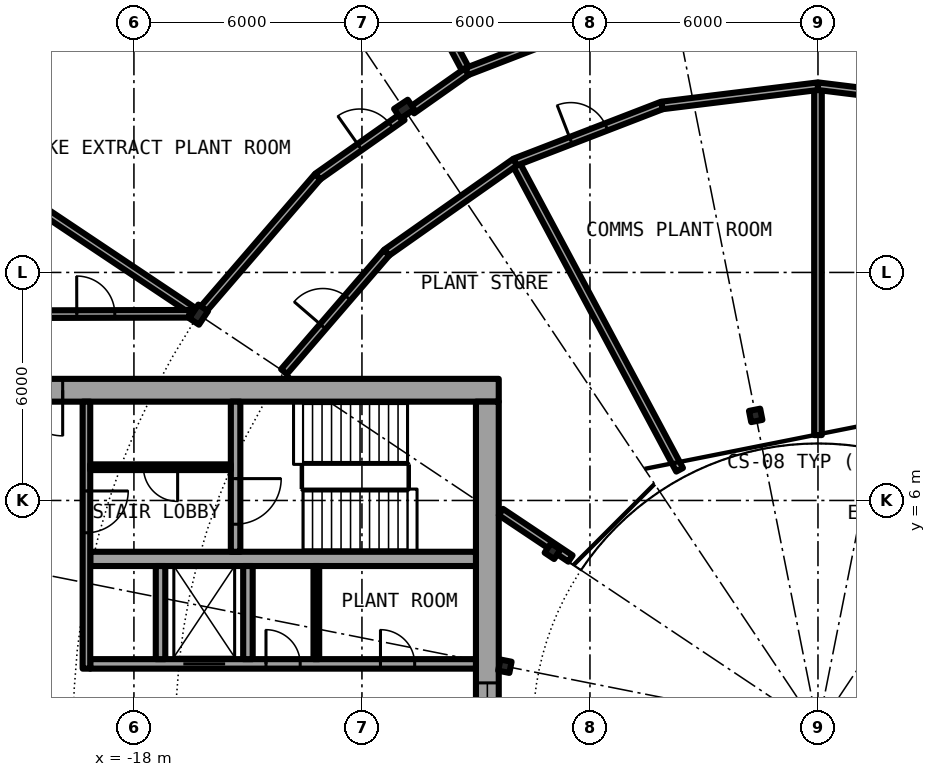
"""IFC4 building model, lengths in metres.
Left out: names, types, materials, properties, quantities, classifications, styles, units other than length and angle.
Written with IfcOpenShell. Run it as: python <this file> out.ifc"""

import sys

from ifc_helpers import new_model, si_unit, direction, frame, frame_2d, origin, origin_2d, place, context, subcontext, project, spatial, rectangle, i_section, extrude, element, fill, save


model = new_model("IFC4")
c1 = context("Model", 3, precision=1e-05, world=origin(), true_north=direction((0.0, 1.0)))
c2 = subcontext(c1, "Body", "Model", "MODEL_VIEW")
j1 = project(units=[si_unit("LENGTHUNIT", "METRE"), si_unit("PLANEANGLEUNIT", "RADIAN")], contexts=[c1])
p1 = place(None, origin())
s1 = spatial("IfcSite", under=j1, at=p1, CompositionType="ELEMENT")
p2 = place(p1, origin())
s2 = spatial("IfcBuilding", under=s1, at=p2, CompositionType="ELEMENT")
p3 = place(p2, frame((0.0, 0.0, 103.25)))
s3 = spatial("IfcBuildingStorey", under=s2, at=p3, CompositionType="ELEMENT", Elevation=103.25)
for number, where, z_axis, x_axis in (
    (1, (-10.889, 16.297, 0.0), (0.0, 0.0, 1.0), (-0.556, 0.831, 0.0)),
    (2, (-16.297, 10.889, 0.0), (0.0, 0.0, 1.0), (-0.831, 0.556, 0.0)),
):
    element("IfcColumn", number, at=place(p3, frame(where, z_axis=z_axis, x_axis=x_axis)), inside=s3, PredefinedType="COLUMN", context=c2, shape_type="SweptSolid", body=[
        extrude(i_section(OverallWidth=0.307, OverallDepth=0.432, WebThickness=0.021, FlangeThickness=0.04, FilletRadius=0.027, at=origin_2d()), origin(), (0.0, 0.0, 1.0), 4.2),
    ])
for number, where, z_axis, x_axis in (
    (3, (-1.639, 8.239, 0.0), (0.0, 0.0, 1.0), (-0.195, 0.981, 0.0)),
    (4, (-6.984, 4.667, 0.0), (0.0, 0.0, 1.0), (-0.831, 0.556, 0.0)),
    (5, (-8.239, 1.639, 0.0), (0.0, 0.0, 1.0), (-0.981, 0.195, 0.0)),
):
    element("IfcColumn", number, at=place(p3, frame(where, z_axis=z_axis, x_axis=x_axis)), inside=s3, PredefinedType="COLUMN", context=c2, shape_type="SweptSolid", body=[
        extrude(i_section(OverallWidth=0.3, OverallDepth=0.3, WebThickness=0.011, FlangeThickness=0.019, FilletRadius=0.027, at=origin_2d()), origin(), (0.0, 0.0, 1.0), 4.2),
    ])
p4 = place(p3, frame((-8.4, 8.9, 0.0), z_axis=(0.0, 0.0, 1.0), x_axis=(-1.0, 0.0, 0.0)))
e6 = element("IfcWall", 6, at=p4, inside=s3, PredefinedType="SHEAR", context=c2, shape_type="SweptSolid", body=[
    extrude(rectangle(XDim=13.8, YDim=0.6, at=frame_2d((6.9, 0.0))), origin(), (0.0, 0.0, 1.0), 4.2),
])
p5 = place(p4, frame((11.475, 0.0, 0.0)))
e7 = element("IfcOpeningElement", 7, at=p5, cuts=e6, PredefinedType="OPENING", context=c2, shape_type="SweptSolid", body=[
    extrude(rectangle(XDim=1.2, YDim=2.3, at=frame_2d((0.6, 1.15))), frame((0.0, 0.31, 0.0), z_axis=(0.0, -1.0, 0.0), x_axis=(1.0, 0.0, 0.0)), (0.0, 0.0, 1.0), 0.62),
])
p6 = place(p3, frame((-8.7, 8.6, 0.0), z_axis=(0.0, 0.0, 1.0), x_axis=(0.0, -1.0, 0.0)))
e8 = element("IfcWall", 8, at=p6, inside=s3, PredefinedType="SHEAR", context=c2, shape_type="SweptSolid", body=[
    extrude(rectangle(XDim=17.2, YDim=0.6, at=frame_2d((8.6, 0.0))), origin(), (0.0, 0.0, 1.0), 4.2),
])
p7 = place(p6, frame((7.4, 0.0, 0.1)))
e9 = element("IfcOpeningElement", 9, at=p7, cuts=e8, PredefinedType="OPENING", context=c2, shape_type="SweptSolid", body=[
    extrude(rectangle(XDim=2.4, YDim=2.2, at=frame_2d((1.2, 1.1))), frame((0.0, 0.31, 0.0), z_axis=(0.0, -1.0, 0.0), x_axis=(1.0, 0.0, 0.0)), (0.0, 0.0, 1.0), 0.62),
])
p8 = place(p3, frame((-19.15, 1.7, 0.0), z_axis=(0.0, 0.0, 1.0), x_axis=(1.0, 0.0, 0.0)))
e10 = element("IfcWall", 10, at=p8, inside=s3, PredefinedType="SHEAR", context=c2, shape_type="SweptSolid", body=[
    extrude(rectangle(XDim=10.15, YDim=0.25, at=frame_2d((5.075, 0.0))), origin(), (0.0, 0.0, 1.0), 4.2),
])
p9 = place(p8, frame((2.45, 0.0, 0.0)))
e11 = element("IfcOpeningElement", 11, at=p9, cuts=e10, PredefinedType="OPENING", context=c2, shape_type="SweptSolid", body=[
    extrude(rectangle(XDim=1.1, YDim=2.3, at=frame_2d((0.55, 1.15))), frame((0.0, 0.135, 0.0), z_axis=(0.0, -1.0, 0.0), x_axis=(1.0, 0.0, 0.0)), (0.0, 0.0, 1.0), 0.27),
])
p10 = place(p8, frame((7.637, 0.0, 0.0)))
e12 = element("IfcOpeningElement", 12, at=p10, cuts=e10, PredefinedType="OPENING", context=c2, shape_type="SweptSolid", body=[
    extrude(rectangle(XDim=0.9, YDim=2.3, at=frame_2d((0.45, 1.15))), frame((0.0, 0.135, 0.0), z_axis=(0.0, -1.0, 0.0), x_axis=(1.0, 0.0, 0.0)), (0.0, 0.0, 1.0), 0.27),
])
p11 = place(p8, frame((4.625, 0.0, 0.0)))
e13 = element("IfcOpeningElement", 13, at=p11, cuts=e10, PredefinedType="OPENING", context=c2, shape_type="SweptSolid", body=[
    extrude(rectangle(XDim=0.9, YDim=2.3, at=frame_2d((0.45, 1.15))), frame((0.0, 0.135, 0.0), z_axis=(0.0, -1.0, 0.0), x_axis=(1.0, 0.0, 0.0)), (0.0, 0.0, 1.0), 0.27),
])
p12 = place(p3, frame((-9.0, 4.462, 0.0), z_axis=(0.0, 0.0, 1.0), x_axis=(-1.0, 0.0, 0.0)))
e14 = element("IfcWall", 14, at=p12, inside=s3, PredefinedType="SHEAR", context=c2, shape_type="SweptSolid", body=[
    extrude(rectangle(XDim=10.15, YDim=0.375, at=frame_2d((5.075, 0.0))), origin(), (0.0, 0.0, 1.0), 4.2),
])
p13 = place(p3, frame((-15.325, 8.6, 0.0), z_axis=(0.0, 0.0, 1.0), x_axis=(0.0, -1.0, 0.0)))
e15 = element("IfcWall", 15, at=p13, inside=s3, PredefinedType="SHEAR", context=c2, shape_type="SweptSolid", body=[
    extrude(rectangle(XDim=3.95, YDim=0.25, at=frame_2d((1.975, 0.0))), origin(), (0.0, 0.0, 1.0), 4.2),
])
p14 = place(p13, frame((2.025, 0.0, 0.0)))
e16 = element("IfcOpeningElement", 16, at=p14, cuts=e15, PredefinedType="OPENING", context=c2, shape_type="SweptSolid", body=[
    extrude(rectangle(XDim=1.2, YDim=2.3, at=frame_2d((0.6, 1.15))), frame((0.0, 0.135, 0.0), z_axis=(0.0, -1.0, 0.0), x_axis=(1.0, 0.0, 0.0)), (0.0, 0.0, 1.0), 0.27),
])
for number, where, z_axis, x_axis in (
    (17, (-15.0, 1.825, 0.0), (0.0, 0.0, 1.0), (0.0, 1.0, 0.0)),
    (18, (-17.3, 1.825, 0.0), (0.0, 0.0, 1.0), (0.0, 1.0, 0.0)),
):
    element("IfcWall", number, at=place(p3, frame(where, z_axis=z_axis, x_axis=x_axis)), inside=s3, PredefinedType="SOLIDWALL", context=c2, shape_type="SweptSolid", body=[
        extrude(rectangle(XDim=2.45, YDim=0.25, at=frame_2d((1.225, 0.0))), origin(), (0.0, 0.0, 1.0), 3.85),
    ])
p15 = place(p3, frame((-19.25, 8.6, 0.0), z_axis=(0.0, 0.0, 1.0), x_axis=(0.0, -1.0, 0.0)))
e19 = element("IfcWall", 19, at=p15, inside=s3, PredefinedType="SOLIDWALL", context=c2, shape_type="SweptSolid", body=[
    extrude(rectangle(XDim=7.025, YDim=0.2, at=frame_2d((3.513, 0.0))), origin(), (0.0, 0.0, 1.0), 3.85),
])
p16 = place(p15, frame((2.35, 0.0, 0.0)))
e20 = element("IfcOpeningElement", 20, at=p16, cuts=e19, PredefinedType="OPENING", context=c2, shape_type="SweptSolid", body=[
    extrude(rectangle(XDim=1.1, YDim=2.3, at=frame_2d((0.55, 1.15))), frame((0.0, 0.11, 0.0), z_axis=(0.0, -1.0, 0.0), x_axis=(1.0, 0.0, 0.0)), (0.0, 0.0, 1.0), 0.22),
])
p17 = place(p3, frame((-13.2, 1.825, 0.0), z_axis=(0.0, 0.0, 1.0), x_axis=(0.0, 1.0, 0.0)))
e21 = element("IfcWall", 21, at=p17, inside=s3, PredefinedType="PARTITIONING", context=c2, shape_type="SweptSolid", body=[
    extrude(rectangle(XDim=2.45, YDim=0.15, at=frame_2d((1.225, 0.0))), origin(), (0.0, 0.0, 1.0), 3.85),
])
p18 = place(p3, frame((-15.45, 6.875, 0.0), z_axis=(0.0, 0.0, 1.0), x_axis=(-1.0, 0.0, 0.0)))
e22 = element("IfcWall", 22, at=p18, inside=s3, PredefinedType="PARTITIONING", context=c2, shape_type="SweptSolid", body=[
    extrude(rectangle(XDim=3.7, YDim=0.15, at=frame_2d((1.85, 0.0))), origin(), (0.0, 0.0, 1.0), 3.85),
])
p19 = place(p18, frame((1.4, 0.0, 0.0)))
e23 = element("IfcOpeningElement", 23, at=p19, cuts=e22, PredefinedType="OPENING", context=c2, shape_type="SweptSolid", body=[
    extrude(rectangle(XDim=0.9, YDim=2.3, at=frame_2d((0.45, 1.15))), frame((0.0, 0.085, 0.0), z_axis=(0.0, -1.0, 0.0), x_axis=(1.0, 0.0, 0.0)), (0.0, 0.0, 1.0), 0.17),
])
p20 = place(p3, frame((-22.595, 15.098, 0.0), z_axis=(0.0, 0.0, 1.0), x_axis=(0.831406593008, -0.555664536482, 0.0)))
e24 = element("IfcWall", 24, at=p20, inside=s3, PredefinedType="PARTITIONING", context=c2, shape_type="SweptSolid", body=[
    extrude(rectangle(XDim=7.358, YDim=0.2, at=frame_2d((3.679, 0.0))), origin(), (0.0, 0.0, 1.0), 3.85),
])
p21 = place(p3, frame((-12.813, 23.965, 0.0), z_axis=(0.0, 0.0, 1.0), x_axis=(0.471439510802, -0.881898399848, 0.0)))
e25 = element("IfcWall", 25, at=p21, inside=s3, PredefinedType="PARTITIONING", context=c2, shape_type="SweptSolid", body=[
    extrude(rectangle(XDim=7.575, YDim=0.2, at=frame_2d((3.787, 0.0))), origin(), (0.0, 0.0, 1.0), 3.85),
])
p22 = place(p3, frame((-7.969, 14.903, 0.0), z_axis=(0.0, 0.0, 1.0), x_axis=(0.471428625665, -0.881904218667, 0.0)))
e26 = element("IfcWall", 26, at=p22, inside=s3, PredefinedType="PARTITIONING", context=c2, shape_type="SweptSolid", body=[
    extrude(rectangle(XDim=9.18, YDim=0.2, at=frame_2d((4.59, 0.0))), origin(), (0.0, 0.0, 1.0), 3.85),
])
p23 = place(p3, frame((0.0, 7.72, 0.0), z_axis=(0.0, 0.0, 1.0), x_axis=(0.0, 1.0, 0.0)))
e27 = element("IfcWall", 27, at=p23, inside=s3, PredefinedType="PARTITIONING", context=c2, shape_type="SweptSolid", body=[
    extrude(rectangle(XDim=9.18, YDim=0.2, at=frame_2d((4.59, 0.0))), origin(), (0.0, 0.0, 1.0), 3.85),
])
p24 = place(p3, frame((-6.513, 4.472, 0.0), z_axis=(0.0, 0.0, 1.0), x_axis=(-0.831333375071, 0.555774072347, 0.0)))
e28 = element("IfcWall", 28, at=p24, inside=s3, PredefinedType="PARTITIONING", context=c2, shape_type="SweptSolid", body=[
    extrude(rectangle(XDim=2.203, YDim=0.2, at=frame_2d((1.101, 0.0))), origin(), (0.0, 0.0, 1.0), 3.85),
])
p25 = place(p3, frame((-21.675, 10.9, 0.0), z_axis=(0.0, 0.0, 1.0), x_axis=(0.999997173357, 0.002377662213, 0.0)))
e29 = element("IfcWall", 29, at=p25, inside=s3, PredefinedType="PARTITIONING", context=c2, shape_type="SweptSolid", body=[
    extrude(rectangle(XDim=5.134, YDim=0.2, at=frame_2d((2.567, 0.0))), origin(), (0.0, 0.0, 1.0), 3.85),
])
p26 = place(p25, frame((2.171, 0.0, 0.0)))
e30 = element("IfcOpeningElement", 30, at=p26, cuts=e29, PredefinedType="OPENING", context=c2, shape_type="SweptSolid", body=[
    extrude(rectangle(XDim=1.0, YDim=2.3, at=frame_2d((0.5, 1.15))), frame((0.0, 0.11, 0.0), z_axis=(0.0, -1.0, 0.0), x_axis=(1.0, 0.0, 0.0)), (0.0, 0.0, 1.0), 0.22),
])
p27 = place(p3, frame((-14.052, 9.389, 0.0), z_axis=(0.0, 0.0, 1.0), x_axis=(0.653212695939, 0.757174467256, 0.0)))
e31 = element("IfcWall", 31, at=p27, inside=s3, PredefinedType="PARTITIONING", context=c2, shape_type="SweptSolid", body=[
    extrude(rectangle(XDim=4.138, YDim=0.2, at=frame_2d((2.069, 0.0))), origin(), (0.0, 0.0, 1.0), 3.85),
])
p28 = place(p27, frame((1.569, 0.0, 0.0)))
e32 = element("IfcOpeningElement", 32, at=p28, cuts=e31, PredefinedType="OPENING", context=c2, shape_type="SweptSolid", body=[
    extrude(rectangle(XDim=1.0, YDim=2.3, at=frame_2d((0.5, 1.15))), frame((0.0, 0.11, 0.0), z_axis=(0.0, -1.0, 0.0), x_axis=(1.0, 0.0, 0.0)), (0.0, 0.0, 1.0), 0.22),
])
p29 = place(p3, frame((-11.349, 12.522, 0.0), z_axis=(0.0, 0.0, 1.0), x_axis=(0.817567680547, 0.575832517079, 0.0)))
e33 = element("IfcWall", 33, at=p29, inside=s3, PredefinedType="PARTITIONING", context=c2, shape_type="SweptSolid", body=[
    extrude(rectangle(XDim=4.137, YDim=0.2, at=frame_2d((2.068, 0.0))), origin(), (0.0, 0.0, 1.0), 3.85),
])
p30 = place(p3, frame((-7.967, 14.904, 0.0), z_axis=(0.0, 0.0, 1.0), x_axis=(0.932943640288, 0.360022449363, 0.0)))
e34 = element("IfcWall", 34, at=p30, inside=s3, PredefinedType="PARTITIONING", context=c2, shape_type="SweptSolid", body=[
    extrude(rectangle(XDim=4.139, YDim=0.2, at=frame_2d((2.069, 0.0))), origin(), (0.0, 0.0, 1.0), 3.85),
])
p31 = place(p30, frame((1.569, 0.0, 0.0)))
e35 = element("IfcOpeningElement", 35, at=p31, cuts=e34, PredefinedType="OPENING", context=c2, shape_type="SweptSolid", body=[
    extrude(rectangle(XDim=1.0, YDim=2.3, at=frame_2d((0.5, 1.15))), frame((0.0, 0.11, 0.0), z_axis=(0.0, -1.0, 0.0), x_axis=(1.0, 0.0, 0.0)), (0.0, 0.0, 1.0), 0.22),
])
for number, where, z_axis, x_axis in (
    (36, (-4.106, 16.394, 0.0), (0.0, 0.0, 1.0), (0.992, 0.122, 0.0)),
    (37, (0.0, 16.9, 0.0), (0.0, 0.0, 1.0), (0.992, -0.122, 0.0)),
):
    element("IfcWall", number, at=place(p3, frame(where, z_axis=z_axis, x_axis=x_axis)), inside=s3, PredefinedType="PARTITIONING", context=c2, shape_type="SweptSolid", body=[
        extrude(rectangle(XDim=4.137, YDim=0.2, at=frame_2d((2.068, 0.0))), origin(), (0.0, 0.0, 1.0), 3.85),
    ])
p32 = place(p3, frame((-16.196, 11.006, 0.0), z_axis=(0.0, 0.0, 1.0), x_axis=(0.653087281304, 0.757282644063, 0.0)))
e38 = element("IfcWall", 38, at=p32, inside=s3, PredefinedType="PARTITIONING", context=c2, shape_type="SweptSolid", body=[
    extrude(rectangle(XDim=4.644, YDim=0.2, at=frame_2d((2.322, 0.0))), origin(), (0.0, 0.0, 1.0), 3.54),
])
p33 = place(p3, frame((-13.163, 14.523, 0.0), z_axis=(0.0, 0.0, 1.0), x_axis=(0.817645456482, 0.575722074872, 0.0)))
e39 = element("IfcWall", 39, at=p33, inside=s3, PredefinedType="PARTITIONING", context=c2, shape_type="SweptSolid", body=[
    extrude(rectangle(XDim=2.724, YDim=0.2, at=frame_2d((1.362, 0.0))), origin(), (0.0, 0.0, 1.0), 3.54),
])
p34 = place(p33, frame((1.35, 0.0, 0.0)))
e40 = element("IfcOpeningElement", 40, at=p34, cuts=e39, PredefinedType="OPENING", context=c2, shape_type="SweptSolid", body=[
    extrude(rectangle(XDim=1.0, YDim=2.3, at=frame_2d((0.5, 1.15))), frame((0.0, 0.11, 0.0), z_axis=(0.0, -1.0, 0.0), x_axis=(1.0, 0.0, 0.0)), (0.0, 0.0, 1.0), 0.22),
])
p35 = place(p3, frame((-10.685, 16.268, 0.0), z_axis=(0.0, 0.0, 1.0), x_axis=(0.817743843048, 0.575582320052, 0.0)))
e41 = element("IfcWall", 41, at=p35, inside=s3, PredefinedType="PARTITIONING", context=c2, shape_type="SweptSolid", body=[
    extrude(rectangle(XDim=1.768, YDim=0.2, at=frame_2d((0.884, 0.0))), origin(), (0.0, 0.0, 1.0), 3.54),
])
p36 = place(p3, frame((-9.239, 17.286, 0.0), z_axis=(0.0, 0.0, 1.0), x_axis=(0.932988479706, 0.359906233255, 0.0)))
e42 = element("IfcWall", 42, at=p36, inside=s3, PredefinedType="PARTITIONING", context=c2, shape_type="SweptSolid", body=[
    extrude(rectangle(XDim=4.799, YDim=0.2, at=frame_2d((2.399, 0.0))), origin(), (0.0, 0.0, 1.0), 3.54),
])
p37 = place(p36, frame((1.899, 0.0, 0.0)))
e43 = element("IfcOpeningElement", 43, at=p37, cuts=e42, PredefinedType="OPENING", context=c2, shape_type="SweptSolid", body=[
    extrude(rectangle(XDim=1.0, YDim=2.3, at=frame_2d((0.5, 1.15))), frame((0.0, 0.11, 0.0), z_axis=(0.0, -1.0, 0.0), x_axis=(1.0, 0.0, 0.0)), (0.0, 0.0, 1.0), 0.22),
])
p38 = place(p9, origin())
e44 = element("IfcDoor", 44, at=p38, inside=s3, OperationType="DOUBLE_DOOR_SLIDING", PredefinedType="DOOR", context=c2, shape_type="SweptSolid", body=[
    extrude(rectangle(XDim=1.1, YDim=2.3, at=frame_2d((0.55, 1.15))), frame((0.0, 0.025, 0.0), z_axis=(0.0, -1.0, 0.0), x_axis=(1.0, 0.0, 0.0)), (0.0, 0.0, 1.0), 0.05),
])
fill(e11, e44)
p39 = place(p10, origin())
e45 = element("IfcDoor", 45, at=p39, inside=s3, OperationType="SINGLE_SWING_LEFT", PredefinedType="DOOR", context=c2, shape_type="SweptSolid", body=[
    extrude(rectangle(XDim=0.9, YDim=2.3, at=frame_2d((0.45, 1.15))), frame((0.0, 0.025, 0.0), z_axis=(0.0, -1.0, 0.0), x_axis=(1.0, 0.0, 0.0)), (0.0, 0.0, 1.0), 0.05),
])
fill(e12, e45)
p40 = place(p11, origin())
e46 = element("IfcDoor", 46, at=p40, inside=s3, OperationType="SINGLE_SWING_LEFT", PredefinedType="DOOR", context=c2, shape_type="SweptSolid", body=[
    extrude(rectangle(XDim=0.9, YDim=2.3, at=frame_2d((0.45, 1.15))), frame((0.0, 0.025, 0.0), z_axis=(0.0, -1.0, 0.0), x_axis=(1.0, 0.0, 0.0)), (0.0, 0.0, 1.0), 0.05),
])
fill(e13, e46)
p41 = place(p19, origin())
e47 = element("IfcDoor", 47, at=p41, inside=s3, OperationType="SINGLE_SWING_LEFT", PredefinedType="DOOR", context=c2, shape_type="SweptSolid", body=[
    extrude(rectangle(XDim=0.9, YDim=2.3, at=frame_2d((0.45, 1.15))), frame((0.0, 0.025, 0.0), z_axis=(0.0, -1.0, 0.0), x_axis=(1.0, 0.0, 0.0)), (0.0, 0.0, 1.0), 0.05),
])
fill(e23, e47)
p42 = place(p14, origin())
e48 = element("IfcDoor", 48, at=p42, inside=s3, OperationType="SINGLE_SWING_LEFT", PredefinedType="DOOR", context=c2, shape_type="SweptSolid", body=[
    extrude(rectangle(XDim=1.2, YDim=2.3, at=frame_2d((0.6, 1.15))), frame((0.0, 0.025, 0.0), z_axis=(0.0, -1.0, 0.0), x_axis=(1.0, 0.0, 0.0)), (0.0, 0.0, 1.0), 0.05),
])
fill(e16, e48)
p43 = place(p16, origin())
e49 = element("IfcDoor", 49, at=p43, inside=s3, OperationType="SINGLE_SWING_RIGHT", PredefinedType="DOOR", context=c2, shape_type="SweptSolid", body=[
    extrude(rectangle(XDim=1.1, YDim=2.3, at=frame_2d((0.55, 1.15))), frame((0.0, 0.025, 0.0), z_axis=(0.0, -1.0, 0.0), x_axis=(1.0, 0.0, 0.0)), (0.0, 0.0, 1.0), 0.05),
])
fill(e20, e49)
p44 = place(p5, origin())
e50 = element("IfcDoor", 50, at=p44, inside=s3, OperationType="SINGLE_SWING_LEFT", PredefinedType="DOOR", context=c2, shape_type="SweptSolid", body=[
    extrude(rectangle(XDim=1.2, YDim=2.3, at=frame_2d((0.6, 1.15))), frame((0.0, 0.025, 0.0), z_axis=(0.0, -1.0, 0.0), x_axis=(1.0, 0.0, 0.0)), (0.0, 0.0, 1.0), 0.05),
])
fill(e7, e50)
p45 = place(p7, origin())
e51 = element("IfcWindow", 51, at=p45, inside=s3, PartitioningType="SINGLE_PANEL", PredefinedType="WINDOW", context=c2, shape_type="SweptSolid", body=[
    extrude(rectangle(XDim=2.4, YDim=2.2, at=frame_2d((1.2, 1.1))), frame((0.0, 0.03, 0.0), z_axis=(0.0, -1.0, 0.0), x_axis=(1.0, 0.0, 0.0)), (0.0, 0.0, 1.0), 0.06),
])
fill(e9, e51)
p46 = place(p34, origin())
e52 = element("IfcDoor", 52, at=p46, inside=s3, OperationType="SINGLE_SWING_RIGHT", PredefinedType="DOOR", context=c2, shape_type="SweptSolid", body=[
    extrude(rectangle(XDim=1.0, YDim=2.3, at=frame_2d((0.5, 1.15))), frame((0.0, 0.025, 0.0), z_axis=(0.0, -1.0, 0.0), x_axis=(1.0, 0.0, 0.0)), (0.0, 0.0, 1.0), 0.05),
])
fill(e40, e52)
p47 = place(p31, origin())
e53 = element("IfcDoor", 53, at=p47, inside=s3, OperationType="SINGLE_SWING_RIGHT", PredefinedType="DOOR", context=c2, shape_type="SweptSolid", body=[
    extrude(rectangle(XDim=1.0, YDim=2.3, at=frame_2d((0.5, 1.15))), frame((0.0, 0.025, 0.0), z_axis=(0.0, -1.0, 0.0), x_axis=(1.0, 0.0, 0.0)), (0.0, 0.0, 1.0), 0.05),
])
fill(e35, e53)
p48 = place(p28, origin())
e54 = element("IfcDoor", 54, at=p48, inside=s3, OperationType="SINGLE_SWING_RIGHT", PredefinedType="DOOR", context=c2, shape_type="SweptSolid", body=[
    extrude(rectangle(XDim=1.0, YDim=2.3, at=frame_2d((0.5, 1.15))), frame((0.0, 0.025, 0.0), z_axis=(0.0, -1.0, 0.0), x_axis=(1.0, 0.0, 0.0)), (0.0, 0.0, 1.0), 0.05),
])
fill(e32, e54)
p49 = place(p26, origin())
e55 = element("IfcDoor", 55, at=p49, inside=s3, OperationType="SINGLE_SWING_RIGHT", PredefinedType="DOOR", context=c2, shape_type="SweptSolid", body=[
    extrude(rectangle(XDim=1.0, YDim=2.3, at=frame_2d((0.5, 1.15))), frame((0.0, 0.025, 0.0), z_axis=(0.0, -1.0, 0.0), x_axis=(1.0, 0.0, 0.0)), (0.0, 0.0, 1.0), 0.05),
])
fill(e30, e55)
save(model, sys.argv[1])
